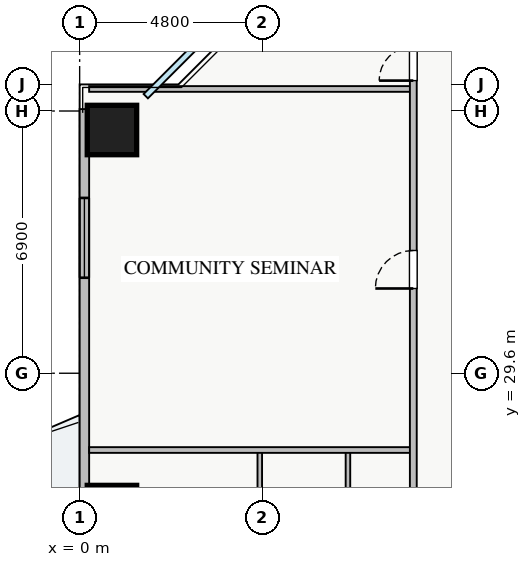
"""IFC4 building model, lengths in metres.
Left out: names, types, materials, properties, quantities, classifications, styles, units other than length and angle.
Written with IfcOpenShell. Run it as: python <this file> out.ifc"""

import sys

from ifc_helpers import new_model, si_unit, direction, frame, frame_2d, origin, origin_2d, place, context, subcontext, project, spatial, rectangle, extrude, source, transform, mapped, element, fill, save


model = new_model("IFC4")
c1 = context("Model", 3, precision=1e-05, world=origin(), true_north=direction((0.0, 1.0)))
c2 = subcontext(c1, "Body", "Model", "MODEL_VIEW")
j1 = project(units=[si_unit("LENGTHUNIT", "METRE"), si_unit("PLANEANGLEUNIT", "RADIAN")], contexts=[c1])
p1 = place(None, origin())
s1 = spatial("IfcSite", under=j1, at=p1, CompositionType="ELEMENT")
p2 = place(p1, origin())
s2 = spatial("IfcBuilding", under=s1, at=p2, CompositionType="ELEMENT")
p3 = place(p2, frame((0.0, 0.0, 69.75)))
s3 = spatial("IfcBuildingStorey", under=s2, at=p3, CompositionType="ELEMENT", Elevation=69.75)
m1 = source(origin(), c2, "Body", "SweptSolid", [
    extrude(rectangle(XDim=1.3, YDim=1.3, at=origin_2d()), origin(), (0.0, 0.0, 1.0), 3.25),
])
for number, where, z_axis, x_axis in (
    (1, (0.85, 36.0, 0.0), (0.0, 0.0, 1.0), (1.0, 0.0, 0.0)),
    (2, (0.85, 26.0, 0.0), (0.0, 0.0, 1.0), (1.0, 0.0, 0.0)),
):
    element("IfcColumn", number, at=place(p3, frame(where, z_axis=z_axis, x_axis=x_axis)), inside=s3, PredefinedType="COLUMN", context=c2, shape_type="MappedRepresentation", body=[
        mapped(m1, transform((0.0, 0.0, 0.0), x_axis=(1.0, 0.0, 0.0), y_axis=(0.0, 1.0, 0.0), z_axis=(0.0, 0.0, 1.0), scale=1.0)),
    ])
p4 = place(p3, frame((0.125, 9.45, 0.0), z_axis=(0.0, 0.0, 1.0), x_axis=(0.0, 1.0, 0.0)))
e3 = element("IfcWall", 3, at=p4, inside=s3, PredefinedType="STANDARD", context=c2, shape_type="SweptSolid", body=[
    extrude(rectangle(XDim=27.1, YDim=0.25, at=frame_2d((13.55, 0.0))), origin(), (0.0, 0.0, 1.0), 2.61),
])
p5 = place(p4, frame((14.4, 0.0, 0.0)))
e4 = element("IfcOpeningElement", 4, at=p5, cuts=e3, PredefinedType="OPENING", context=c2, shape_type="SweptSolid", body=[
    extrude(rectangle(XDim=1.2, YDim=2.1, at=frame_2d((0.6, 1.05))), frame((0.0, 0.135, 0.0), z_axis=(0.0, -1.0, 0.0), x_axis=(1.0, 0.0, 0.0)), (0.0, 0.0, 1.0), 0.27),
])
p6 = place(p4, frame((1.403, 0.0, 0.9)))
e5 = element("IfcOpeningElement", 5, at=p6, cuts=e3, PredefinedType="OPENING", context=c2, shape_type="SweptSolid", body=[
    extrude(rectangle(XDim=1.8, YDim=1.5, at=frame_2d((0.9, 0.75))), frame((0.0, 0.135, 0.0), z_axis=(0.0, -1.0, 0.0), x_axis=(1.0, 0.0, 0.0)), (0.0, 0.0, 1.0), 0.27),
])
p7 = place(p4, frame((22.663, 0.0, 0.9)))
e6 = element("IfcOpeningElement", 6, at=p7, cuts=e3, PredefinedType="OPENING", context=c2, shape_type="SweptSolid", body=[
    extrude(rectangle(XDim=2.1, YDim=1.48, at=frame_2d((1.05, 0.74))), frame((0.0, 0.135, 0.0), z_axis=(0.0, -1.0, 0.0), x_axis=(1.0, 0.0, 0.0)), (0.0, 0.0, 1.0), 0.27),
])
p8 = place(p4, frame((4.607, 0.0, 0.9)))
e7 = element("IfcOpeningElement", 7, at=p8, cuts=e3, PredefinedType="OPENING", context=c2, shape_type="SweptSolid", body=[
    extrude(rectangle(XDim=2.4, YDim=1.5, at=frame_2d((1.2, 0.75))), frame((0.0, 0.135, 0.0), z_axis=(0.0, -1.0, 0.0), x_axis=(1.0, 0.0, 0.0)), (0.0, 0.0, 1.0), 0.27),
])
p9 = place(p4, frame((13.17, 0.0, 0.9)))
e8 = element("IfcOpeningElement", 8, at=p9, cuts=e3, PredefinedType="OPENING", context=c2, shape_type="SweptSolid", body=[
    extrude(rectangle(XDim=0.9, YDim=1.2, at=frame_2d((0.45, 0.6))), frame((0.0, 0.135, 0.0), z_axis=(0.0, -1.0, 0.0), x_axis=(1.0, 0.0, 0.0)), (0.0, 0.0, 1.0), 0.27),
])
p10 = place(p4, frame((8.405, 0.0, 0.9)))
e9 = element("IfcOpeningElement", 9, at=p10, cuts=e3, PredefinedType="OPENING", context=c2, shape_type="SweptSolid", body=[
    extrude(rectangle(XDim=0.9, YDim=1.2, at=frame_2d((0.45, 0.6))), frame((0.0, 0.135, 0.0), z_axis=(0.0, -1.0, 0.0), x_axis=(1.0, 0.0, 0.0)), (0.0, 0.0, 1.0), 0.27),
])
p11 = place(p3, frame((0.25, 37.08, 0.0), z_axis=(0.0, 0.0, 1.0), x_axis=(1.0, 0.0, 0.0)))
e10 = element("IfcWall", 10, at=p11, inside=s3, PredefinedType="PARTITIONING", context=c2, shape_type="SweptSolid", body=[
    extrude(rectangle(XDim=8.53, YDim=0.15, at=frame_2d((4.265, 0.0))), origin(), (0.0, 0.0, 1.0), 3.07),
])
for number, where, z_axis, x_axis in (
    (11, (4.74, 22.4, 0.0), (0.0, 0.0, 1.0), (0.0, 1.0, 0.0)),
    (12, (7.06, 22.4, 0.0), (0.0, 0.0, 1.0), (0.0, 1.0, 0.0)),
):
    element("IfcWall", number, at=place(p3, frame(where, z_axis=z_axis, x_axis=x_axis)), inside=s3, PredefinedType="PLUMBINGWALL", context=c2, shape_type="SweptSolid", body=[
        extrude(rectangle(XDim=5.18, YDim=0.12, at=frame_2d((2.59, 0.0))), origin(), (0.0, 0.0, 1.0), 3.07),
    ])
p12 = place(p3, frame((0.25, 27.58, 0.0), z_axis=(0.0, 0.0, 1.0), x_axis=(1.0, 0.0, 0.0)))
e13 = element("IfcWall", 13, at=p12, inside=s3, PredefinedType="PARTITIONING", context=c2, shape_type="SweptSolid", body=[
    extrude(rectangle(XDim=8.53, YDim=0.15, at=frame_2d((4.265, 0.0))), origin(), (0.0, 0.0, 1.0), 2.821),
])
p13 = place(p3, frame((8.78, 7.21, 0.0), z_axis=(0.0, 0.0, 1.0), x_axis=(0.0, 1.0, 0.0)))
e14 = element("IfcWall", 14, at=p13, inside=s3, PredefinedType="PARTITIONING", context=c2, shape_type="SweptSolid", body=[
    extrude(rectangle(XDim=31.23, YDim=0.18, at=frame_2d((15.615, 0.0))), origin(), (0.0, 0.0, 1.0), 3.07),
])
p14 = place(p13, frame((30.09, 0.0, 0.0)))
e15 = element("IfcOpeningElement", 15, at=p14, cuts=e14, PredefinedType="OPENING", context=c2, shape_type="SweptSolid", body=[
    extrude(rectangle(XDim=0.9, YDim=2.05, at=frame_2d((0.45, 1.025))), frame((0.0, 0.1, 0.0), z_axis=(0.0, -1.0, 0.0), x_axis=(1.0, 0.0, 0.0)), (0.0, 0.0, 1.0), 0.2),
])
p15 = place(p13, frame((0.24, 0.0, 0.0)))
e16 = element("IfcOpeningElement", 16, at=p15, cuts=e14, PredefinedType="OPENING", context=c2, shape_type="SweptSolid", body=[
    extrude(rectangle(XDim=0.9, YDim=2.05, at=frame_2d((0.45, 1.025))), frame((0.0, 0.1, 0.0), z_axis=(0.0, -1.0, 0.0), x_axis=(1.0, 0.0, 0.0)), (0.0, 0.0, 1.0), 0.2),
])
p16 = place(p13, frame((2.84, 0.0, 0.0)))
e17 = element("IfcOpeningElement", 17, at=p16, cuts=e14, PredefinedType="OPENING", context=c2, shape_type="SweptSolid", body=[
    extrude(rectangle(XDim=1.0, YDim=2.05, at=frame_2d((0.5, 1.025))), frame((0.0, 0.1, 0.0), z_axis=(0.0, -1.0, 0.0), x_axis=(1.0, 0.0, 0.0)), (0.0, 0.0, 1.0), 0.2),
])
p17 = place(p13, frame((12.11, 0.0, 0.0)))
e18 = element("IfcOpeningElement", 18, at=p17, cuts=e14, PredefinedType="OPENING", context=c2, shape_type="SweptSolid", body=[
    extrude(rectangle(XDim=1.0, YDim=2.05, at=frame_2d((0.5, 1.025))), frame((0.0, 0.1, 0.0), z_axis=(0.0, -1.0, 0.0), x_axis=(1.0, 0.0, 0.0)), (0.0, 0.0, 1.0), 0.2),
])
p18 = place(p13, frame((24.62, 0.0, 0.0)))
e19 = element("IfcOpeningElement", 19, at=p18, cuts=e14, PredefinedType="OPENING", context=c2, shape_type="SweptSolid", body=[
    extrude(rectangle(XDim=1.0, YDim=2.05, at=frame_2d((0.5, 1.025))), frame((0.0, 0.1, 0.0), z_axis=(0.0, -1.0, 0.0), x_axis=(1.0, 0.0, 0.0)), (0.0, 0.0, 1.0), 0.2),
])
m2 = source(origin(), c2, "Body", "SweptSolid", [
    extrude(rectangle(XDim=2.1, YDim=1.48, at=frame_2d((1.05, 0.74))), frame((0.0, 0.03, 0.0), z_axis=(0.0, -1.0, 0.0), x_axis=(1.0, 0.0, 0.0)), (0.0, 0.0, 1.0), 0.06),
])
p19 = place(p7, origin())
e20 = element("IfcWindow", 20, at=p19, inside=s3, PartitioningType="TRIPLE_PANEL_VERTICAL", PredefinedType="WINDOW", context=c2, shape_type="MappedRepresentation", body=[
    mapped(m2, transform((0.0, 0.0, 0.0), x_axis=(1.0, 0.0, 0.0), y_axis=(0.0, 1.0, 0.0), z_axis=(0.0, 0.0, 1.0), scale=1.0)),
])
fill(e6, e20)
m3 = source(origin(), c2, "Body", "SweptSolid", [
    extrude(rectangle(XDim=0.9, YDim=2.05, at=frame_2d((0.45, 1.025))), frame((0.0, 0.025, 0.0), z_axis=(0.0, -1.0, 0.0), x_axis=(1.0, 0.0, 0.0)), (0.0, 0.0, 1.0), 0.05),
])
p20 = place(p14, origin())
e21 = element("IfcDoor", 21, at=p20, inside=s3, OperationType="SINGLE_SWING_LEFT", PredefinedType="DOOR", context=c2, shape_type="MappedRepresentation", body=[
    mapped(m3, transform((0.0, 0.0, 0.0), x_axis=(1.0, 0.0, 0.0), y_axis=(0.0, 1.0, 0.0), z_axis=(0.0, 0.0, 1.0), scale=1.0)),
])
fill(e15, e21)
m4 = source(origin(), c2, "Body", "SweptSolid", [
    extrude(rectangle(XDim=1.0, YDim=2.05, at=frame_2d((0.5, 1.025))), frame((0.0, 0.025, 0.0), z_axis=(0.0, -1.0, 0.0), x_axis=(1.0, 0.0, 0.0)), (0.0, 0.0, 1.0), 0.05),
])
p21 = place(p18, origin())
e22 = element("IfcDoor", 22, at=p21, inside=s3, OperationType="SINGLE_SWING_LEFT", PredefinedType="DOOR", context=c2, shape_type="MappedRepresentation", body=[
    mapped(m4, transform((0.0, 0.0, 0.0), x_axis=(1.0, 0.0, 0.0), y_axis=(0.0, 1.0, 0.0), z_axis=(0.0, 0.0, 1.0), scale=1.0)),
])
fill(e19, e22)
save(model, sys.argv[1])
